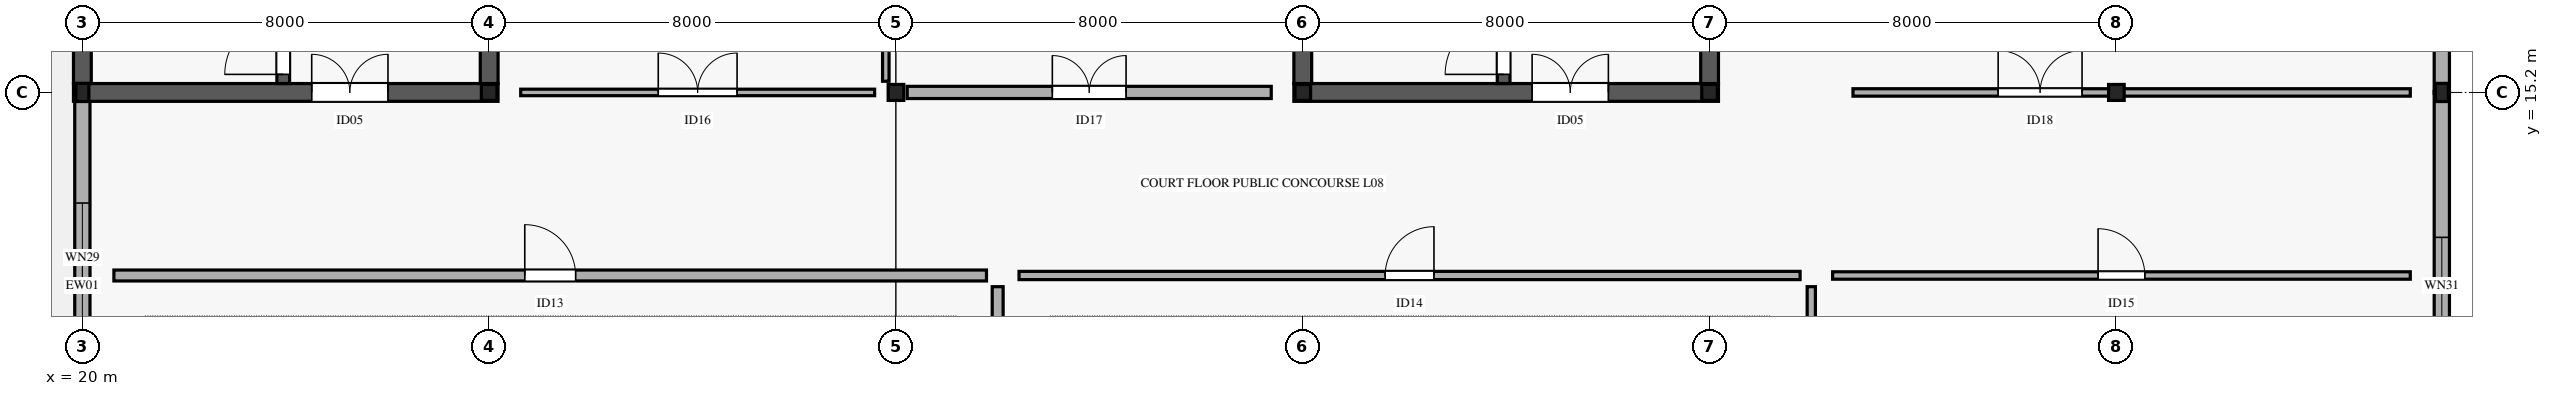
"""IFC4 building model, lengths in metres.
Left out: names, types, materials, properties, quantities, classifications, styles, units other than length and angle.
Written with IfcOpenShell. Run it as: python <this file> out.ifc"""

import sys

from ifc_helpers import new_model, si_unit, direction, frame, frame_2d, origin, origin_2d, place, context, subcontext, project, spatial, rectangle, i_section, extrude, element, fill, save


model = new_model("IFC4")
c1 = context("Model", 3, precision=1e-05, world=origin(), true_north=direction((0.0, 1.0)))
c2 = subcontext(c1, "Body", "Model", "MODEL_VIEW")
j1 = project(units=[si_unit("LENGTHUNIT", "METRE"), si_unit("PLANEANGLEUNIT", "RADIAN")], contexts=[c1])
p1 = place(None, origin())
s1 = spatial("IfcSite", under=j1, at=p1, CompositionType="ELEMENT")
p2 = place(p1, origin())
s2 = spatial("IfcBuilding", under=s1, at=p2, CompositionType="ELEMENT")
p3 = place(p2, frame((0.0, 0.0, 37.8)))
s3 = spatial("IfcBuildingStorey", under=s2, at=p3, CompositionType="ELEMENT", Elevation=37.8)
p4 = place(p3, frame((20.0, 15.2, 0.0), z_axis=(0.0, 0.0, 1.0), x_axis=(1.0, 0.0, 0.0)))
e1 = element("IfcColumn", 1, at=p4, inside=s3, PredefinedType="COLUMN", context=c2, shape_type="SweptSolid", body=[
    extrude(i_section(OverallWidth=0.255, OverallDepth=0.357, WebThickness=0.01, FlangeThickness=0.018, FilletRadius=0.015, at=origin_2d()), origin(), (0.0, 0.0, 1.0), 4.0),
])
for number, where, z_axis, x_axis in (
    (2, (28.0, 15.2, 0.0), (0.0, 0.0, 1.0), (1.0, 0.0, 0.0)),
    (3, (36.0, 15.2, 0.0), (0.0, 0.0, 1.0), (1.0, 0.0, 0.0)),
    (4, (44.0, 15.2, 0.0), (0.0, 0.0, 1.0), (1.0, 0.0, 0.0)),
    (5, (52.0, 15.2, 0.0), (0.0, 0.0, 1.0), (1.0, 0.0, 0.0)),
    (6, (60.0, 15.2, 0.0), (0.0, 0.0, 1.0), (1.0, 0.0, 0.0)),
):
    element("IfcColumn", number, at=place(p3, frame(where, z_axis=z_axis, x_axis=x_axis)), inside=s3, PredefinedType="COLUMN", context=c2, shape_type="SweptSolid", body=[
        extrude(i_section(OverallWidth=0.307, OverallDepth=0.314, WebThickness=0.012, FlangeThickness=0.019, FilletRadius=0.015, at=origin_2d()), origin(), (0.0, 0.0, 1.0), 4.0),
    ])
p5 = place(p3, frame((66.4, 15.2, 0.0), z_axis=(0.0, 0.0, 1.0), x_axis=(1.0, 0.0, 0.0)))
e7 = element("IfcColumn", 7, at=p5, inside=s3, PredefinedType="COLUMN", context=c2, shape_type="SweptSolid", body=[
    extrude(i_section(OverallWidth=0.255, OverallDepth=0.357, WebThickness=0.01, FlangeThickness=0.018, FilletRadius=0.015, at=origin_2d()), origin(), (0.0, 0.0, 1.0), 4.0),
])
p6 = place(p3, frame((20.0, 7.58, 0.0), z_axis=(0.0, 0.0, 1.0), x_axis=(0.0, 1.0, 0.0)))
e8 = element("IfcWall", 8, at=p6, inside=s3, PredefinedType="STANDARD", context=c2, shape_type="SweptSolid", body=[
    extrude(rectangle(XDim=7.64, YDim=0.3, at=frame_2d((3.82, 0.0))), origin(), (0.0, 0.0, 1.0), 3.06),
])
p7 = place(p6, frame((2.195, 0.0, 0.75)))
e9 = element("IfcOpeningElement", 9, at=p7, cuts=e8, PredefinedType="OPENING", context=c2, shape_type="SweptSolid", body=[
    extrude(rectangle(XDim=3.25, YDim=1.55, at=frame_2d((1.625, 0.775))), frame((0.0, 0.16, 0.0), z_axis=(0.0, -1.0, 0.0), x_axis=(1.0, 0.0, 0.0)), (0.0, 0.0, 1.0), 0.32),
])
p8 = place(p3, frame((66.4, 22.82, 0.0), z_axis=(0.0, 0.0, 1.0), x_axis=(0.0, -1.0, 0.0)))
e10 = element("IfcWall", 10, at=p8, inside=s3, PredefinedType="STANDARD", context=c2, shape_type="SweptSolid", body=[
    extrude(rectangle(XDim=7.64, YDim=0.3, at=frame_2d((3.82, 0.0))), origin(), (0.0, 0.0, 1.0), 3.06),
])
p9 = place(p8, frame((3.07, 0.0, 0.75)))
e11 = element("IfcOpeningElement", 11, at=p9, cuts=e10, PredefinedType="OPENING", context=c2, shape_type="SweptSolid", body=[
    extrude(rectangle(XDim=1.5, YDim=1.3, at=frame_2d((0.75, 0.65))), frame((0.0, 0.16, 0.0), z_axis=(0.0, -1.0, 0.0), x_axis=(1.0, 0.0, 0.0)), (0.0, 0.0, 1.0), 0.32),
])
p10 = place(p3, frame((66.4, 15.22, 0.0), z_axis=(0.0, 0.0, 1.0), x_axis=(0.0, -1.0, 0.0)))
e12 = element("IfcWall", 12, at=p10, inside=s3, PredefinedType="STANDARD", context=c2, shape_type="SweptSolid", body=[
    extrude(rectangle(XDim=7.64, YDim=0.3, at=frame_2d((3.82, 0.0))), origin(), (0.0, 0.0, 1.0), 3.06),
])
p11 = place(p10, frame((2.87, 0.0, 0.75)))
e13 = element("IfcOpeningElement", 13, at=p11, cuts=e12, PredefinedType="OPENING", context=c2, shape_type="SweptSolid", body=[
    extrude(rectangle(XDim=1.9, YDim=1.3, at=frame_2d((0.95, 0.65))), frame((0.0, 0.16, 0.0), z_axis=(0.0, -1.0, 0.0), x_axis=(1.0, 0.0, 0.0)), (0.0, 0.0, 1.0), 0.32),
])
p12 = place(p3, frame((19.825, 15.2, 0.0), z_axis=(0.0, 0.0, 1.0), x_axis=(1.0, 0.0, 0.0)))
e14 = element("IfcWall", 14, at=p12, inside=s3, PredefinedType="SHEAR", context=c2, shape_type="SweptSolid", body=[
    extrude(rectangle(XDim=8.35, YDim=0.35, at=frame_2d((4.175, 0.0))), origin(), (0.0, 0.0, 1.0), 3.99),
])
p13 = place(p12, frame((4.685, 0.0, 0.0)))
e15 = element("IfcOpeningElement", 15, at=p13, cuts=e14, PredefinedType="OPENING", context=c2, shape_type="SweptSolid", body=[
    extrude(rectangle(XDim=1.5, YDim=2.2, at=frame_2d((0.75, 1.1))), frame((0.0, 0.185, 0.0), z_axis=(0.0, -1.0, 0.0), x_axis=(1.0, 0.0, 0.0)), (0.0, 0.0, 1.0), 0.37),
])
for number, where, z_axis, x_axis in (
    (16, (20.0, 15.375, 0.0), (0.0, 0.0, 1.0), (0.0, 1.0, 0.0)),
    (17, (28.0, 15.375, 0.0), (0.0, 0.0, 1.0), (0.0, 1.0, 0.0)),
):
    element("IfcWall", number, at=place(p3, frame(where, z_axis=z_axis, x_axis=x_axis)), inside=s3, PredefinedType="SHEAR", context=c2, shape_type="SweptSolid", body=[
        extrude(rectangle(XDim=7.25, YDim=0.35, at=frame_2d((3.625, 0.0))), origin(), (0.0, 0.0, 1.0), 3.99),
    ])
p14 = place(p3, frame((23.95, 15.375, 0.0), z_axis=(0.0, 0.0, 1.0), x_axis=(0.0, 1.0, 0.0)))
e18 = element("IfcWall", 18, at=p14, inside=s3, PredefinedType="SHEAR", context=c2, shape_type="SweptSolid", body=[
    extrude(rectangle(XDim=7.25, YDim=0.25, at=frame_2d((3.625, 0.0))), origin(), (0.0, 0.0, 1.0), 3.99),
])
p15 = place(p14, frame((0.18, 0.0, 0.0)))
e19 = element("IfcOpeningElement", 19, at=p15, cuts=e18, PredefinedType="OPENING", context=c2, shape_type="SweptSolid", body=[
    extrude(rectangle(XDim=1.15, YDim=2.2, at=frame_2d((0.575, 1.1))), frame((0.0, 0.135, 0.0), z_axis=(0.0, -1.0, 0.0), x_axis=(1.0, 0.0, 0.0)), (0.0, 0.0, 1.0), 0.27),
])
p16 = place(p3, frame((43.825, 15.2, 0.0), z_axis=(0.0, 0.0, 1.0), x_axis=(1.0, 0.0, 0.0)))
e20 = element("IfcWall", 20, at=p16, inside=s3, PredefinedType="SHEAR", context=c2, shape_type="SweptSolid", body=[
    extrude(rectangle(XDim=8.35, YDim=0.35, at=frame_2d((4.175, 0.0))), origin(), (0.0, 0.0, 1.0), 3.99),
])
p17 = place(p16, frame((4.685, 0.0, 0.0)))
e21 = element("IfcOpeningElement", 21, at=p17, cuts=e20, PredefinedType="OPENING", context=c2, shape_type="SweptSolid", body=[
    extrude(rectangle(XDim=1.5, YDim=2.2, at=frame_2d((0.75, 1.1))), frame((0.0, 0.185, 0.0), z_axis=(0.0, -1.0, 0.0), x_axis=(1.0, 0.0, 0.0)), (0.0, 0.0, 1.0), 0.37),
])
for number, where, z_axis, x_axis in (
    (22, (44.0, 15.375, 0.0), (0.0, 0.0, 1.0), (0.0, 1.0, 0.0)),
    (23, (52.0, 15.375, 0.0), (0.0, 0.0, 1.0), (0.0, 1.0, 0.0)),
):
    element("IfcWall", number, at=place(p3, frame(where, z_axis=z_axis, x_axis=x_axis)), inside=s3, PredefinedType="SHEAR", context=c2, shape_type="SweptSolid", body=[
        extrude(rectangle(XDim=7.25, YDim=0.35, at=frame_2d((3.625, 0.0))), origin(), (0.0, 0.0, 1.0), 3.99),
    ])
p18 = place(p3, frame((47.95, 15.375, 0.0), z_axis=(0.0, 0.0, 1.0), x_axis=(0.0, 1.0, 0.0)))
e24 = element("IfcWall", 24, at=p18, inside=s3, PredefinedType="SHEAR", context=c2, shape_type="SweptSolid", body=[
    extrude(rectangle(XDim=7.25, YDim=0.25, at=frame_2d((3.625, 0.0))), origin(), (0.0, 0.0, 1.0), 3.99),
])
p19 = place(p18, frame((0.18, 0.0, 0.0)))
e25 = element("IfcOpeningElement", 25, at=p19, cuts=e24, PredefinedType="OPENING", context=c2, shape_type="SweptSolid", body=[
    extrude(rectangle(XDim=1.15, YDim=2.2, at=frame_2d((0.575, 1.1))), frame((0.0, 0.135, 0.0), z_axis=(0.0, -1.0, 0.0), x_axis=(1.0, 0.0, 0.0)), (0.0, 0.0, 1.0), 0.27),
])
p20 = place(p3, frame((20.62, 11.6, 0.0), z_axis=(0.0, 0.0, 1.0), x_axis=(1.0, 0.0, 0.0)))
e26 = element("IfcWall", 26, at=p20, inside=s3, PredefinedType="PARTITIONING", context=c2, shape_type="SweptSolid", body=[
    extrude(rectangle(XDim=17.16, YDim=0.215, at=frame_2d((8.58, 0.0))), origin(), (0.0, 0.0, 1.0), 2.85),
])
p21 = place(p20, frame((8.08, 0.0, 0.0)))
e27 = element("IfcOpeningElement", 27, at=p21, cuts=e26, PredefinedType="OPENING", context=c2, shape_type="SweptSolid", body=[
    extrude(rectangle(XDim=1.0, YDim=2.3, at=frame_2d((0.5, 1.15))), frame((0.0, 0.117, 0.0), z_axis=(0.0, -1.0, 0.0), x_axis=(1.0, 0.0, 0.0)), (0.0, 0.0, 1.0), 0.235),
])
p22 = place(p3, frame((38.0, 0.62, 0.0), z_axis=(0.0, 0.0, 1.0), x_axis=(0.0, 1.0, 0.0)))
e28 = element("IfcWall", 28, at=p22, inside=s3, PredefinedType="PARTITIONING", context=c2, shape_type="SweptSolid", body=[
    extrude(rectangle(XDim=10.76, YDim=0.215, at=frame_2d((5.38, 0.0))), origin(), (0.0, 0.0, 1.0), 2.85),
])
p23 = place(p3, frame((38.42, 11.6, 0.0), z_axis=(0.0, 0.0, 1.0), x_axis=(1.0, 0.0, 0.0)))
e29 = element("IfcWall", 29, at=p23, inside=s3, PredefinedType="PARTITIONING", context=c2, shape_type="SweptSolid", body=[
    extrude(rectangle(XDim=15.36, YDim=0.162, at=frame_2d((7.68, 0.0))), origin(), (0.0, 0.0, 1.0), 2.85),
])
p24 = place(p23, frame((7.2, 0.0, 0.0)))
e30 = element("IfcOpeningElement", 30, at=p24, cuts=e29, PredefinedType="OPENING", context=c2, shape_type="SweptSolid", body=[
    extrude(rectangle(XDim=0.96, YDim=2.25, at=frame_2d((0.48, 1.125))), frame((0.0, 0.091, 0.0), z_axis=(0.0, -1.0, 0.0), x_axis=(1.0, 0.0, 0.0)), (0.0, 0.0, 1.0), 0.182),
])
p25 = place(p3, frame((54.0, 0.62, 0.0), z_axis=(0.0, 0.0, 1.0), x_axis=(0.0, 1.0, 0.0)))
e31 = element("IfcWall", 31, at=p25, inside=s3, PredefinedType="PARTITIONING", context=c2, shape_type="SweptSolid", body=[
    extrude(rectangle(XDim=10.76, YDim=0.162, at=frame_2d((5.38, 0.0))), origin(), (0.0, 0.0, 1.0), 2.85),
])
p26 = place(p3, frame((54.42, 11.6, 0.0), z_axis=(0.0, 0.0, 1.0), x_axis=(1.0, 0.0, 0.0)))
e32 = element("IfcWall", 32, at=p26, inside=s3, PredefinedType="PARTITIONING", context=c2, shape_type="SweptSolid", body=[
    extrude(rectangle(XDim=11.36, YDim=0.146, at=frame_2d((5.68, 0.0))), origin(), (0.0, 0.0, 1.0), 2.85),
])
p27 = place(p26, frame((5.22, 0.0, 0.0)))
e33 = element("IfcOpeningElement", 33, at=p27, cuts=e32, PredefinedType="OPENING", context=c2, shape_type="SweptSolid", body=[
    extrude(rectangle(XDim=0.92, YDim=2.2, at=frame_2d((0.46, 1.1))), frame((0.0, 0.083, 0.0), z_axis=(0.0, -1.0, 0.0), x_axis=(1.0, 0.0, 0.0)), (0.0, 0.0, 1.0), 0.166),
])
p28 = place(p3, frame((28.62, 15.2, 0.0), z_axis=(0.0, 0.0, 1.0), x_axis=(1.0, 0.0, 0.0)))
e34 = element("IfcWall", 34, at=p28, inside=s3, PredefinedType="PARTITIONING", context=c2, shape_type="SweptSolid", body=[
    extrude(rectangle(XDim=6.96, YDim=0.128, at=frame_2d((3.48, 0.0))), origin(), (0.0, 0.0, 1.0), 2.85),
])
p29 = place(p28, frame((2.705, 0.0, 0.0)))
e35 = element("IfcOpeningElement", 35, at=p29, cuts=e34, PredefinedType="OPENING", context=c2, shape_type="SweptSolid", body=[
    extrude(rectangle(XDim=1.55, YDim=2.3, at=frame_2d((0.775, 1.15))), frame((0.0, 0.074, 0.0), z_axis=(0.0, -1.0, 0.0), x_axis=(1.0, 0.0, 0.0)), (0.0, 0.0, 1.0), 0.148),
])
p30 = place(p3, frame((35.8, 15.42, 0.0), z_axis=(0.0, 0.0, 1.0), x_axis=(0.0, 1.0, 0.0)))
e36 = element("IfcWall", 36, at=p30, inside=s3, PredefinedType="PARTITIONING", context=c2, shape_type="SweptSolid", body=[
    extrude(rectangle(XDim=6.76, YDim=0.128, at=frame_2d((3.38, 0.0))), origin(), (0.0, 0.0, 1.0), 2.85),
])
p31 = place(p3, frame((36.22, 15.2, 0.0), z_axis=(0.0, 0.0, 1.0), x_axis=(1.0, 0.0, 0.0)))
e37 = element("IfcWall", 37, at=p31, inside=s3, PredefinedType="PARTITIONING", context=c2, shape_type="SweptSolid", body=[
    extrude(rectangle(XDim=7.16, YDim=0.24, at=frame_2d((3.58, 0.0))), origin(), (0.0, 0.0, 1.0), 2.85),
])
p32 = place(p31, frame((2.855, 0.0, 0.0)))
e38 = element("IfcOpeningElement", 38, at=p32, cuts=e37, PredefinedType="OPENING", context=c2, shape_type="SweptSolid", body=[
    extrude(rectangle(XDim=1.45, YDim=2.25, at=frame_2d((0.725, 1.125))), frame((0.0, 0.13, 0.0), z_axis=(0.0, -1.0, 0.0), x_axis=(1.0, 0.0, 0.0)), (0.0, 0.0, 1.0), 0.26),
])
p33 = place(p3, frame((54.82, 15.2, 0.0), z_axis=(0.0, 0.0, 1.0), x_axis=(1.0, 0.0, 0.0)))
e39 = element("IfcWall", 39, at=p33, inside=s3, PredefinedType="PARTITIONING", context=c2, shape_type="SweptSolid", body=[
    extrude(rectangle(XDim=10.96, YDim=0.146, at=frame_2d((5.48, 0.0))), origin(), (0.0, 0.0, 1.0), 2.85),
])
p34 = place(p33, frame((2.855, 0.0, 0.0)))
e40 = element("IfcOpeningElement", 40, at=p34, cuts=e39, PredefinedType="OPENING", context=c2, shape_type="SweptSolid", body=[
    extrude(rectangle(XDim=1.65, YDim=2.3, at=frame_2d((0.825, 1.15))), frame((0.0, 0.083, 0.0), z_axis=(0.0, -1.0, 0.0), x_axis=(1.0, 0.0, 0.0)), (0.0, 0.0, 1.0), 0.166),
])
p35 = place(p7, origin())
e41 = element("IfcWindow", 41, at=p35, inside=s3, PartitioningType="SINGLE_PANEL", PredefinedType="WINDOW", context=c2, shape_type="SweptSolid", body=[
    extrude(rectangle(XDim=3.25, YDim=1.55, at=frame_2d((1.625, 0.775))), frame((0.0, 0.03, 0.0), z_axis=(0.0, -1.0, 0.0), x_axis=(1.0, 0.0, 0.0)), (0.0, 0.0, 1.0), 0.06),
])
fill(e9, e41)
p36 = place(p11, origin())
e42 = element("IfcWindow", 42, at=p36, inside=s3, PartitioningType="SINGLE_PANEL", PredefinedType="WINDOW", context=c2, shape_type="SweptSolid", body=[
    extrude(rectangle(XDim=1.9, YDim=1.3, at=frame_2d((0.95, 0.65))), frame((0.0, 0.03, 0.0), z_axis=(0.0, -1.0, 0.0), x_axis=(1.0, 0.0, 0.0)), (0.0, 0.0, 1.0), 0.06),
])
fill(e13, e42)
p37 = place(p15, origin())
e43 = element("IfcDoor", 43, at=p37, inside=s3, OperationType="SINGLE_SWING_LEFT", PredefinedType="DOOR", context=c2, shape_type="SweptSolid", body=[
    extrude(rectangle(XDim=1.15, YDim=2.2, at=frame_2d((0.575, 1.1))), frame((0.0, 0.025, 0.0), z_axis=(0.0, -1.0, 0.0), x_axis=(1.0, 0.0, 0.0)), (0.0, 0.0, 1.0), 0.05),
])
fill(e19, e43)
p38 = place(p13, origin())
e44 = element("IfcDoor", 44, at=p38, inside=s3, OperationType="DOUBLE_DOOR_SINGLE_SWING", PredefinedType="DOOR", context=c2, shape_type="SweptSolid", body=[
    extrude(rectangle(XDim=1.5, YDim=2.2, at=frame_2d((0.75, 1.1))), frame((0.0, 0.025, 0.0), z_axis=(0.0, -1.0, 0.0), x_axis=(1.0, 0.0, 0.0)), (0.0, 0.0, 1.0), 0.05),
])
fill(e15, e44)
p39 = place(p19, origin())
e45 = element("IfcDoor", 45, at=p39, inside=s3, OperationType="SINGLE_SWING_LEFT", PredefinedType="DOOR", context=c2, shape_type="SweptSolid", body=[
    extrude(rectangle(XDim=1.15, YDim=2.2, at=frame_2d((0.575, 1.1))), frame((0.0, 0.025, 0.0), z_axis=(0.0, -1.0, 0.0), x_axis=(1.0, 0.0, 0.0)), (0.0, 0.0, 1.0), 0.05),
])
fill(e25, e45)
p40 = place(p17, origin())
e46 = element("IfcDoor", 46, at=p40, inside=s3, OperationType="DOUBLE_DOOR_SINGLE_SWING", PredefinedType="DOOR", context=c2, shape_type="SweptSolid", body=[
    extrude(rectangle(XDim=1.5, YDim=2.2, at=frame_2d((0.75, 1.1))), frame((0.0, 0.025, 0.0), z_axis=(0.0, -1.0, 0.0), x_axis=(1.0, 0.0, 0.0)), (0.0, 0.0, 1.0), 0.05),
])
fill(e21, e46)
p41 = place(p21, origin())
e47 = element("IfcDoor", 47, at=p41, inside=s3, OperationType="SINGLE_SWING_LEFT", PredefinedType="DOOR", context=c2, shape_type="SweptSolid", body=[
    extrude(rectangle(XDim=1.0, YDim=2.3, at=frame_2d((0.5, 1.15))), frame((0.0, 0.025, 0.0), z_axis=(0.0, -1.0, 0.0), x_axis=(1.0, 0.0, 0.0)), (0.0, 0.0, 1.0), 0.05),
])
fill(e27, e47)
p42 = place(p24, origin())
e48 = element("IfcDoor", 48, at=p42, inside=s3, OperationType="SINGLE_SWING_RIGHT", PredefinedType="DOOR", context=c2, shape_type="SweptSolid", body=[
    extrude(rectangle(XDim=0.96, YDim=2.25, at=frame_2d((0.48, 1.125))), frame((0.0, 0.025, 0.0), z_axis=(0.0, -1.0, 0.0), x_axis=(1.0, 0.0, 0.0)), (0.0, 0.0, 1.0), 0.05),
])
fill(e30, e48)
p43 = place(p27, origin())
e49 = element("IfcDoor", 49, at=p43, inside=s3, OperationType="SINGLE_SWING_LEFT", PredefinedType="DOOR", context=c2, shape_type="SweptSolid", body=[
    extrude(rectangle(XDim=0.92, YDim=2.2, at=frame_2d((0.46, 1.1))), frame((0.0, 0.025, 0.0), z_axis=(0.0, -1.0, 0.0), x_axis=(1.0, 0.0, 0.0)), (0.0, 0.0, 1.0), 0.05),
])
fill(e33, e49)
p44 = place(p29, origin())
e50 = element("IfcDoor", 50, at=p44, inside=s3, OperationType="DOUBLE_DOOR_SINGLE_SWING", PredefinedType="DOOR", context=c2, shape_type="SweptSolid", body=[
    extrude(rectangle(XDim=1.55, YDim=2.3, at=frame_2d((0.775, 1.15))), frame((0.0, 0.025, 0.0), z_axis=(0.0, -1.0, 0.0), x_axis=(1.0, 0.0, 0.0)), (0.0, 0.0, 1.0), 0.05),
])
fill(e35, e50)
p45 = place(p32, origin())
e51 = element("IfcDoor", 51, at=p45, inside=s3, OperationType="DOUBLE_DOOR_SINGLE_SWING", PredefinedType="DOOR", context=c2, shape_type="SweptSolid", body=[
    extrude(rectangle(XDim=1.45, YDim=2.25, at=frame_2d((0.725, 1.125))), frame((0.0, 0.025, 0.0), z_axis=(0.0, -1.0, 0.0), x_axis=(1.0, 0.0, 0.0)), (0.0, 0.0, 1.0), 0.05),
])
fill(e38, e51)
p46 = place(p34, origin())
e52 = element("IfcDoor", 52, at=p46, inside=s3, OperationType="DOUBLE_DOOR_SINGLE_SWING", PredefinedType="DOOR", context=c2, shape_type="SweptSolid", body=[
    extrude(rectangle(XDim=1.65, YDim=2.3, at=frame_2d((0.825, 1.15))), frame((0.0, 0.025, 0.0), z_axis=(0.0, -1.0, 0.0), x_axis=(1.0, 0.0, 0.0)), (0.0, 0.0, 1.0), 0.05),
])
fill(e40, e52)
save(model, sys.argv[1])
